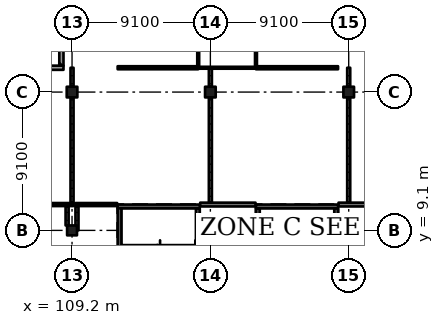
"""IFC4 building model, lengths in metres.
Left out: names, types, materials, properties, quantities, classifications, styles, units other than length and angle.
Written with IfcOpenShell. Run it as: python <this file> out.ifc"""

import sys

from ifc_helpers import new_model, si_unit, direction, frame, frame_2d, origin, origin_2d, place, context, subcontext, project, spatial, rectangle, extrude, element, fill, save


model = new_model("IFC4")
c1 = context("Model", 3, precision=1e-05, world=origin(), true_north=direction((0.0, 1.0)))
c2 = subcontext(c1, "Body", "Model", "MODEL_VIEW")
j1 = project(units=[si_unit("LENGTHUNIT", "METRE"), si_unit("PLANEANGLEUNIT", "RADIAN")], contexts=[c1])
p1 = place(None, origin())
s1 = spatial("IfcSite", under=j1, at=p1, CompositionType="ELEMENT")
p2 = place(p1, origin())
s2 = spatial("IfcBuilding", under=s1, at=p2, CompositionType="ELEMENT")
p3 = place(p2, frame((0.0, 0.0, 15.47)))
s3 = spatial("IfcBuildingStorey", under=s2, at=p3, CompositionType="ELEMENT", Elevation=15.47)
p4 = place(p3, frame((109.2, 9.1, 0.0), z_axis=(0.0, 0.0, 1.0), x_axis=(1.0, 0.0, 0.0)))
e1 = element("IfcColumn", 1, at=p4, inside=s3, PredefinedType="COLUMN", context=c2, shape_type="SweptSolid", body=[
    extrude(rectangle(XDim=0.65, YDim=0.65, at=origin_2d()), origin(), (0.0, 0.0, 1.0), 4.55),
])
p5 = place(p3, frame((109.2, 18.2, 0.0), z_axis=(0.0, 0.0, 1.0), x_axis=(1.0, 0.0, 0.0)))
e2 = element("IfcColumn", 2, at=p5, inside=s3, PredefinedType="COLUMN", context=c2, shape_type="SweptSolid", body=[
    extrude(rectangle(XDim=0.7, YDim=0.7, at=origin_2d()), origin(), (0.0, 0.0, 1.0), 4.55),
])
p6 = place(p3, frame((118.3, 9.1, 0.0), z_axis=(0.0, 0.0, 1.0), x_axis=(1.0, 0.0, 0.0)))
e3 = element("IfcColumn", 3, at=p6, inside=s3, PredefinedType="COLUMN", context=c2, shape_type="SweptSolid", body=[
    extrude(rectangle(XDim=0.6, YDim=0.6, at=origin_2d()), origin(), (0.0, 0.0, 1.0), 4.55),
])
p7 = place(p3, frame((118.3, 18.2, 0.0), z_axis=(0.0, 0.0, 1.0), x_axis=(1.0, 0.0, 0.0)))
e4 = element("IfcColumn", 4, at=p7, inside=s3, PredefinedType="COLUMN", context=c2, shape_type="SweptSolid", body=[
    extrude(rectangle(XDim=0.7, YDim=0.7, at=origin_2d()), origin(), (0.0, 0.0, 1.0), 4.55),
])
p8 = place(p3, frame((127.4, 9.1, 0.0), z_axis=(0.0, 0.0, 1.0), x_axis=(1.0, 0.0, 0.0)))
e5 = element("IfcColumn", 5, at=p8, inside=s3, PredefinedType="COLUMN", context=c2, shape_type="SweptSolid", body=[
    extrude(rectangle(XDim=0.6, YDim=0.6, at=origin_2d()), origin(), (0.0, 0.0, 1.0), 4.55),
])
p9 = place(p3, frame((127.4, 18.2, 0.0), z_axis=(0.0, 0.0, 1.0), x_axis=(1.0, 0.0, 0.0)))
e6 = element("IfcColumn", 6, at=p9, inside=s3, PredefinedType="COLUMN", context=c2, shape_type="SweptSolid", body=[
    extrude(rectangle(XDim=0.7, YDim=0.7, at=origin_2d()), origin(), (0.0, 0.0, 1.0), 4.55),
])
p10 = place(p3, frame((126.7, 10.675, 0.0), z_axis=(0.0, 0.0, 1.0), x_axis=(-1.0, 0.0, 0.0)))
e7 = element("IfcWall", 7, at=p10, inside=s3, PredefinedType="SHEAR", context=c2, shape_type="SweptSolid", body=[
    extrude(rectangle(XDim=5.4, YDim=0.25, at=frame_2d((2.7, 0.0))), origin(), (0.0, 0.0, 1.0), 4.55),
])
p11 = place(p10, frame((1.5, 0.0, 0.0)))
e8 = element("IfcOpeningElement", 8, at=p11, cuts=e7, PredefinedType="OPENING", context=c2, shape_type="SweptSolid", body=[
    extrude(rectangle(XDim=2.4, YDim=2.1, at=frame_2d((1.2, 1.05))), frame((0.0, 0.135, 0.0), z_axis=(0.0, -1.0, 0.0), x_axis=(1.0, 0.0, 0.0)), (0.0, 0.0, 1.0), 0.27),
])
for number, where, z_axis, x_axis in (
    (9, (121.425, 10.55, 0.0), (0.0, 0.0, 1.0), (0.0, -1.0, 0.0)),
    (10, (126.575, 10.55, 0.0), (0.0, 0.0, 1.0), (0.0, -1.0, 0.0)),
):
    element("IfcWall", number, at=place(p3, frame(where, z_axis=z_axis, x_axis=x_axis)), inside=s3, PredefinedType="SHEAR", context=c2, shape_type="SweptSolid", body=[
        extrude(rectangle(XDim=9.6, YDim=0.25, at=frame_2d((4.8, 0.0))), origin(), (0.0, 0.0, 1.0), 4.55),
    ])
p12 = place(p3, frame((117.6, 10.675, 0.0), z_axis=(0.0, 0.0, 1.0), x_axis=(-1.0, 0.0, 0.0)))
e11 = element("IfcWall", 11, at=p12, inside=s3, PredefinedType="SHEAR", context=c2, shape_type="SweptSolid", body=[
    extrude(rectangle(XDim=5.4, YDim=0.25, at=frame_2d((2.7, 0.0))), origin(), (0.0, 0.0, 1.0), 4.55),
])
p13 = place(p12, frame((1.5, 0.0, 0.0)))
e12 = element("IfcOpeningElement", 12, at=p13, cuts=e11, PredefinedType="OPENING", context=c2, shape_type="SweptSolid", body=[
    extrude(rectangle(XDim=2.4, YDim=2.1, at=frame_2d((1.2, 1.05))), frame((0.0, 0.135, 0.0), z_axis=(0.0, -1.0, 0.0), x_axis=(1.0, 0.0, 0.0)), (0.0, 0.0, 1.0), 0.27),
])
for number, where, z_axis, x_axis in (
    (13, (112.325, 10.55, 0.0), (0.0, 0.0, 1.0), (0.0, -1.0, 0.0)),
    (14, (117.475, 10.55, 0.0), (0.0, 0.0, 1.0), (0.0, -1.0, 0.0)),
):
    element("IfcWall", number, at=place(p3, frame(where, z_axis=z_axis, x_axis=x_axis)), inside=s3, PredefinedType="SHEAR", context=c2, shape_type="SweptSolid", body=[
        extrude(rectangle(XDim=9.6, YDim=0.25, at=frame_2d((4.8, 0.0))), origin(), (0.0, 0.0, 1.0), 4.55),
    ])
p14 = place(p3, frame((104.95, 19.8, 0.0), z_axis=(0.0, 0.0, 1.0), x_axis=(1.0, 0.0, 0.0)))
e15 = element("IfcWall", 15, at=p14, inside=s3, PredefinedType="SOLIDWALL", context=c2, shape_type="SweptSolid", body=[
    extrude(rectangle(XDim=3.688, YDim=0.275, at=frame_2d((1.844, 0.0))), origin(), (0.0, 0.0, 1.0), 4.3),
])
p15 = place(p14, frame((1.25, 0.0, 0.0)))
e16 = element("IfcOpeningElement", 16, at=p15, cuts=e15, PredefinedType="OPENING", context=c2, shape_type="SweptSolid", body=[
    extrude(rectangle(XDim=1.2, YDim=2.4, at=frame_2d((0.6, 1.2))), frame((0.0, 0.147, 0.0), z_axis=(0.0, -1.0, 0.0), x_axis=(1.0, 0.0, 0.0)), (0.0, 0.0, 1.0), 0.295),
])
p16 = place(p3, frame((108.5, 19.938, 0.0), z_axis=(0.0, 0.0, 1.0), x_axis=(0.0, 1.0, 0.0)))
e17 = element("IfcWall", 17, at=p16, inside=s3, PredefinedType="SOLIDWALL", context=c2, shape_type="SweptSolid", body=[
    extrude(rectangle(XDim=6.9, YDim=0.275, at=frame_2d((3.45, 0.0))), origin(), (0.0, 0.0, 1.0), 4.3),
])
p17 = place(p3, frame((108.875, 9.425, 0.0), z_axis=(0.0, 0.0, 1.0), x_axis=(0.0, 1.0, 0.0)))
e18 = element("IfcWall", 18, at=p17, inside=s3, PredefinedType="PARTITIONING", context=c2, shape_type="SweptSolid", body=[
    extrude(rectangle(XDim=1.275, YDim=0.2, at=frame_2d((0.637, 0.0))), origin(), (0.0, 0.0, 1.0), 4.3),
])
p18 = place(p3, frame((104.538, 10.8, 0.0), z_axis=(0.0, 0.0, 1.0), x_axis=(1.0, 0.0, 0.0)))
e19 = element("IfcWall", 19, at=p18, inside=s3, PredefinedType="PARTITIONING", context=c2, shape_type="SweptSolid", body=[
    extrude(rectangle(XDim=4.762, YDim=0.2, at=frame_2d((2.381, 0.0))), origin(), (0.0, 0.0, 1.0), 4.3),
])
p19 = place(p18, frame((1.288, 0.0, 0.0)))
e20 = element("IfcOpeningElement", 20, at=p19, cuts=e19, PredefinedType="OPENING", context=c2, shape_type="SweptSolid", body=[
    extrude(rectangle(XDim=1.8, YDim=2.4, at=frame_2d((0.9, 1.2))), frame((0.0, 0.11, 0.0), z_axis=(0.0, -1.0, 0.0), x_axis=(1.0, 0.0, 0.0)), (0.0, 0.0, 1.0), 0.22),
])
p20 = place(p3, frame((109.2, 10.9, 0.0), z_axis=(0.0, 0.0, 1.0), x_axis=(0.0, 1.0, 0.0)))
e21 = element("IfcWall", 21, at=p20, inside=s3, PredefinedType="PARTITIONING", context=c2, shape_type="SweptSolid", body=[
    extrude(rectangle(XDim=6.95, YDim=0.2, at=frame_2d((3.475, 0.0))), origin(), (0.0, 0.0, 1.0), 3.55),
])
p21 = place(p20, frame((0.85, 0.0, 0.0)))
e22 = element("IfcOpeningElement", 22, at=p21, cuts=e21, PredefinedType="OPENING", context=c2, shape_type="SweptSolid", body=[
    extrude(rectangle(XDim=1.8, YDim=2.4, at=frame_2d((0.9, 1.2))), frame((0.0, 0.11, 0.0), z_axis=(0.0, -1.0, 0.0), x_axis=(1.0, 0.0, 0.0)), (0.0, 0.0, 1.0), 0.22),
])
p22 = place(p20, frame((4.35, 0.0, 0.0)))
e23 = element("IfcOpeningElement", 23, at=p22, cuts=e21, PredefinedType="OPENING", context=c2, shape_type="SweptSolid", body=[
    extrude(rectangle(XDim=1.8, YDim=2.4, at=frame_2d((0.9, 1.2))), frame((0.0, 0.11, 0.0), z_axis=(0.0, -1.0, 0.0), x_axis=(1.0, 0.0, 0.0)), (0.0, 0.0, 1.0), 0.22),
])
p23 = place(p3, frame((109.2, 18.55, 0.0), z_axis=(0.0, 0.0, 1.0), x_axis=(0.0, 1.0, 0.0)))
e24 = element("IfcWall", 24, at=p23, inside=s3, PredefinedType="PARTITIONING", context=c2, shape_type="SweptSolid", body=[
    extrude(rectangle(XDim=1.25, YDim=0.2, at=frame_2d((0.625, 0.0))), origin(), (0.0, 0.0, 1.0), 3.55),
])
p24 = place(p3, frame((109.525, 9.1, 0.0), z_axis=(0.0, 0.0, 1.0), x_axis=(0.0, 1.0, 0.0)))
e25 = element("IfcWall", 25, at=p24, inside=s3, PredefinedType="PARTITIONING", context=c2, shape_type="SweptSolid", body=[
    extrude(rectangle(XDim=1.6, YDim=0.2, at=frame_2d((0.8, 0.0))), origin(), (0.0, 0.0, 1.0), 4.3),
])
p25 = place(p3, frame((112.17, 10.8, 0.0), z_axis=(0.0, 0.0, 1.0), x_axis=(-1.0, 0.0, 0.0)))
e26 = element("IfcWall", 26, at=p25, inside=s3, PredefinedType="PARTITIONING", context=c2, shape_type="SweptSolid", body=[
    extrude(rectangle(XDim=2.745, YDim=0.2, at=frame_2d((1.373, 0.0))), origin(), (0.0, 0.0, 1.0), 4.3),
])
p26 = place(p25, frame((0.45, 0.0, 0.0)))
e27 = element("IfcOpeningElement", 27, at=p26, cuts=e26, PredefinedType="OPENING", context=c2, shape_type="SweptSolid", body=[
    extrude(rectangle(XDim=1.8, YDim=2.4, at=frame_2d((0.9, 1.2))), frame((0.0, 0.11, 0.0), z_axis=(0.0, -1.0, 0.0), x_axis=(1.0, 0.0, 0.0)), (0.0, 0.0, 1.0), 0.22),
])
p27 = place(p3, frame((112.2, 19.8, 0.0), z_axis=(0.0, 0.0, 1.0), x_axis=(1.0, 0.0, 0.0)))
e28 = element("IfcWall", 28, at=p27, inside=s3, PredefinedType="PARTITIONING", context=c2, shape_type="SweptSolid", body=[
    extrude(rectangle(XDim=5.3, YDim=0.2, at=frame_2d((2.65, 0.0))), origin(), (0.0, 0.0, 1.0), 4.3),
])
p28 = place(p27, frame((1.75, 0.0, 0.0)))
e29 = element("IfcOpeningElement", 29, at=p28, cuts=e28, PredefinedType="OPENING", context=c2, shape_type="SweptSolid", body=[
    extrude(rectangle(XDim=1.8, YDim=2.4, at=frame_2d((0.9, 1.2))), frame((0.0, 0.11, 0.0), z_axis=(0.0, -1.0, 0.0), x_axis=(1.0, 0.0, 0.0)), (0.0, 0.0, 1.0), 0.22),
])
p29 = place(p3, frame((117.5, 19.8, 0.0), z_axis=(0.0, 0.0, 1.0), x_axis=(1.0, 0.0, 0.0)))
e30 = element("IfcWall", 30, at=p29, inside=s3, PredefinedType="PARTITIONING", context=c2, shape_type="SweptSolid", body=[
    extrude(rectangle(XDim=3.8, YDim=0.125, at=frame_2d((1.9, 0.0))), origin(), (0.0, 0.0, 1.0), 4.3),
])
p30 = place(p29, frame((1.85, 0.0, 0.0)))
e31 = element("IfcOpeningElement", 31, at=p30, cuts=e30, PredefinedType="OPENING", context=c2, shape_type="SweptSolid", body=[
    extrude(rectangle(XDim=0.9, YDim=2.1, at=frame_2d((0.45, 1.05))), frame((0.0, 0.073, 0.0), z_axis=(0.0, -1.0, 0.0), x_axis=(1.0, 0.0, 0.0)), (0.0, 0.0, 1.0), 0.145),
])
p31 = place(p3, frame((117.5, 19.9, 0.0), z_axis=(0.0, 0.0, 1.0), x_axis=(0.0, 1.0, 0.0)))
e32 = element("IfcWall", 32, at=p31, inside=s3, PredefinedType="PARTITIONING", context=c2, shape_type="SweptSolid", body=[
    extrude(rectangle(XDim=2.87, YDim=0.125, at=frame_2d((1.435, 0.0))), origin(), (0.0, 0.0, 1.0), 4.3),
])
for number, where, z_axis, x_axis in (
    (33, (117.63, 8.8, 0.0), (0.0, 0.0, 1.0), (1.0, 0.0, 0.0)),
    (34, (118.0, 9.4, 0.0), (0.0, 0.0, 1.0), (-1.0, 0.0, 0.0)),
):
    element("IfcWall", number, at=place(p3, frame(where, z_axis=z_axis, x_axis=x_axis)), inside=s3, PredefinedType="SOLIDWALL", context=c2, shape_type="SweptSolid", body=[
        extrude(rectangle(XDim=0.37, YDim=0.25, at=frame_2d((0.185, 0.0))), origin(), (0.0, 0.0, 1.0), 4.3),
    ])
p32 = place(p3, frame((117.63, 10.8, 0.0), z_axis=(0.0, 0.0, 1.0), x_axis=(1.0, 0.0, 0.0)))
e35 = element("IfcWall", 35, at=p32, inside=s3, PredefinedType="SOLIDWALL", context=c2, shape_type="SweptSolid", body=[
    extrude(rectangle(XDim=3.64, YDim=0.25, at=frame_2d((1.82, 0.0))), origin(), (0.0, 0.0, 1.0), 4.3),
])
p33 = place(p32, frame((1.69, 0.0, 0.0)))
e36 = element("IfcOpeningElement", 36, at=p33, cuts=e35, PredefinedType="OPENING", context=c2, shape_type="SweptSolid", body=[
    extrude(rectangle(XDim=1.0, YDim=2.1, at=frame_2d((0.5, 1.05))), frame((0.0, 0.135, 0.0), z_axis=(0.0, -1.0, 0.0), x_axis=(1.0, 0.0, 0.0)), (0.0, 0.0, 1.0), 0.27),
])
p34 = place(p3, frame((118.3, 10.925, 0.0), z_axis=(0.0, 0.0, 1.0), x_axis=(0.0, 1.0, 0.0)))
e37 = element("IfcWall", 37, at=p34, inside=s3, PredefinedType="PARTITIONING", context=c2, shape_type="SweptSolid", body=[
    extrude(rectangle(XDim=6.925, YDim=0.2, at=frame_2d((3.462, 0.0))), origin(), (0.0, 0.0, 1.0), 3.55),
])
p35 = place(p34, frame((0.85, 0.0, 0.0)))
e38 = element("IfcOpeningElement", 38, at=p35, cuts=e37, PredefinedType="OPENING", context=c2, shape_type="SweptSolid", body=[
    extrude(rectangle(XDim=1.8, YDim=2.4, at=frame_2d((0.9, 1.2))), frame((0.0, 0.11, 0.0), z_axis=(0.0, -1.0, 0.0), x_axis=(1.0, 0.0, 0.0)), (0.0, 0.0, 1.0), 0.22),
])
p36 = place(p34, frame((4.25, 0.0, 0.0)))
e39 = element("IfcOpeningElement", 39, at=p36, cuts=e37, PredefinedType="OPENING", context=c2, shape_type="SweptSolid", body=[
    extrude(rectangle(XDim=1.8, YDim=2.4, at=frame_2d((0.9, 1.2))), frame((0.0, 0.11, 0.0), z_axis=(0.0, -1.0, 0.0), x_axis=(1.0, 0.0, 0.0)), (0.0, 0.0, 1.0), 0.22),
])
p37 = place(p3, frame((118.3, 18.55, 0.0), z_axis=(0.0, 0.0, 1.0), x_axis=(0.0, 1.0, 0.0)))
e40 = element("IfcWall", 40, at=p37, inside=s3, PredefinedType="PARTITIONING", context=c2, shape_type="SweptSolid", body=[
    extrude(rectangle(XDim=1.188, YDim=0.2, at=frame_2d((0.594, 0.0))), origin(), (0.0, 0.0, 1.0), 3.55),
])
p38 = place(p3, frame((121.3, 19.8, 0.0), z_axis=(0.0, 0.0, 1.0), x_axis=(1.0, 0.0, 0.0)))
e41 = element("IfcWall", 41, at=p38, inside=s3, PredefinedType="PARTITIONING", context=c2, shape_type="SweptSolid", body=[
    extrude(rectangle(XDim=5.4, YDim=0.2, at=frame_2d((2.7, 0.0))), origin(), (0.0, 0.0, 1.0), 4.3),
])
p39 = place(p38, frame((1.85, 0.0, 0.0)))
e42 = element("IfcOpeningElement", 42, at=p39, cuts=e41, PredefinedType="OPENING", context=c2, shape_type="SweptSolid", body=[
    extrude(rectangle(XDim=1.8, YDim=2.4, at=frame_2d((0.9, 1.2))), frame((0.0, 0.11, 0.0), z_axis=(0.0, -1.0, 0.0), x_axis=(1.0, 0.0, 0.0)), (0.0, 0.0, 1.0), 0.22),
])
p40 = place(p3, frame((121.3, 19.9, 0.0), z_axis=(0.0, 0.0, 1.0), x_axis=(0.0, 1.0, 0.0)))
e43 = element("IfcWall", 43, at=p40, inside=s3, PredefinedType="PARTITIONING", context=c2, shape_type="SweptSolid", body=[
    extrude(rectangle(XDim=6.97, YDim=0.125, at=frame_2d((3.485, 0.0))), origin(), (0.0, 0.0, 1.0), 4.3),
])
for number, where, z_axis, x_axis in (
    (44, (126.73, 8.8, 0.0), (0.0, 0.0, 1.0), (1.0, 0.0, 0.0)),
    (45, (127.1, 9.4, 0.0), (0.0, 0.0, 1.0), (-1.0, 0.0, 0.0)),
):
    element("IfcWall", number, at=place(p3, frame(where, z_axis=z_axis, x_axis=x_axis)), inside=s3, PredefinedType="SOLIDWALL", context=c2, shape_type="SweptSolid", body=[
        extrude(rectangle(XDim=0.37, YDim=0.25, at=frame_2d((0.185, 0.0))), origin(), (0.0, 0.0, 1.0), 4.3),
    ])
p41 = place(p3, frame((126.73, 10.8, 0.0), z_axis=(0.0, 0.0, 1.0), x_axis=(1.0, 0.0, 0.0)))
e46 = element("IfcWall", 46, at=p41, inside=s3, PredefinedType="SOLIDWALL", context=c2, shape_type="SweptSolid", body=[
    extrude(rectangle(XDim=3.64, YDim=0.25, at=frame_2d((1.82, 0.0))), origin(), (0.0, 0.0, 1.0), 4.3),
])
p42 = place(p41, frame((1.79, 0.0, 0.0)))
e47 = element("IfcOpeningElement", 47, at=p42, cuts=e46, PredefinedType="OPENING", context=c2, shape_type="SweptSolid", body=[
    extrude(rectangle(XDim=0.8, YDim=2.1, at=frame_2d((0.4, 1.05))), frame((0.0, 0.135, 0.0), z_axis=(0.0, -1.0, 0.0), x_axis=(1.0, 0.0, 0.0)), (0.0, 0.0, 1.0), 0.27),
])
p43 = place(p3, frame((127.4, 10.925, 0.0), z_axis=(0.0, 0.0, 1.0), x_axis=(0.0, 1.0, 0.0)))
e48 = element("IfcWall", 48, at=p43, inside=s3, PredefinedType="PARTITIONING", context=c2, shape_type="SweptSolid", body=[
    extrude(rectangle(XDim=6.925, YDim=0.2, at=frame_2d((3.462, 0.0))), origin(), (0.0, 0.0, 1.0), 3.55),
])
p44 = place(p43, frame((0.85, 0.0, 0.0)))
e49 = element("IfcOpeningElement", 49, at=p44, cuts=e48, PredefinedType="OPENING", context=c2, shape_type="SweptSolid", body=[
    extrude(rectangle(XDim=1.8, YDim=2.4, at=frame_2d((0.9, 1.2))), frame((0.0, 0.11, 0.0), z_axis=(0.0, -1.0, 0.0), x_axis=(1.0, 0.0, 0.0)), (0.0, 0.0, 1.0), 0.22),
])
p45 = place(p43, frame((4.25, 0.0, 0.0)))
e50 = element("IfcOpeningElement", 50, at=p45, cuts=e48, PredefinedType="OPENING", context=c2, shape_type="SweptSolid", body=[
    extrude(rectangle(XDim=1.8, YDim=2.4, at=frame_2d((0.9, 1.2))), frame((0.0, 0.11, 0.0), z_axis=(0.0, -1.0, 0.0), x_axis=(1.0, 0.0, 0.0)), (0.0, 0.0, 1.0), 0.22),
])
p46 = place(p3, frame((127.4, 18.55, 0.0), z_axis=(0.0, 0.0, 1.0), x_axis=(0.0, 1.0, 0.0)))
e51 = element("IfcWall", 51, at=p46, inside=s3, PredefinedType="PARTITIONING", context=c2, shape_type="SweptSolid", body=[
    extrude(rectangle(XDim=1.25, YDim=0.2, at=frame_2d((0.625, 0.0))), origin(), (0.0, 0.0, 1.0), 3.55),
])
p47 = place(p30, origin())
e52 = element("IfcDoor", 52, at=p47, inside=s3, OperationType="SINGLE_SWING_LEFT", PredefinedType="DOOR", context=c2, shape_type="SweptSolid", body=[
    extrude(rectangle(XDim=0.9, YDim=2.1, at=frame_2d((0.45, 1.05))), frame((0.0, 0.025, 0.0), z_axis=(0.0, -1.0, 0.0), x_axis=(1.0, 0.0, 0.0)), (0.0, 0.0, 1.0), 0.05),
])
fill(e31, e52)
p48 = place(p33, origin())
e53 = element("IfcDoor", 53, at=p48, inside=s3, OperationType="SINGLE_SWING_RIGHT", PredefinedType="DOOR", context=c2, shape_type="SweptSolid", body=[
    extrude(rectangle(XDim=1.0, YDim=2.1, at=frame_2d((0.5, 1.05))), frame((0.0, 0.025, 0.0), z_axis=(0.0, -1.0, 0.0), x_axis=(1.0, 0.0, 0.0)), (0.0, 0.0, 1.0), 0.05),
])
fill(e36, e53)
p49 = place(p44, origin())
e54 = element("IfcDoor", 54, at=p49, inside=s3, OperationType="DOUBLE_DOOR_SINGLE_SWING", PredefinedType="DOOR", context=c2, shape_type="SweptSolid", body=[
    extrude(rectangle(XDim=1.8, YDim=2.4, at=frame_2d((0.9, 1.2))), frame((0.0, 0.025, 0.0), z_axis=(0.0, -1.0, 0.0), x_axis=(1.0, 0.0, 0.0)), (0.0, 0.0, 1.0), 0.05),
])
fill(e49, e54)
p50 = place(p45, origin())
e55 = element("IfcDoor", 55, at=p50, inside=s3, OperationType="DOUBLE_DOOR_SINGLE_SWING", PredefinedType="DOOR", context=c2, shape_type="SweptSolid", body=[
    extrude(rectangle(XDim=1.8, YDim=2.4, at=frame_2d((0.9, 1.2))), frame((0.0, 0.025, 0.0), z_axis=(0.0, -1.0, 0.0), x_axis=(1.0, 0.0, 0.0)), (0.0, 0.0, 1.0), 0.05),
])
fill(e50, e55)
p51 = place(p35, origin())
e56 = element("IfcDoor", 56, at=p51, inside=s3, OperationType="DOUBLE_DOOR_SINGLE_SWING", PredefinedType="DOOR", context=c2, shape_type="SweptSolid", body=[
    extrude(rectangle(XDim=1.8, YDim=2.4, at=frame_2d((0.9, 1.2))), frame((0.0, 0.025, 0.0), z_axis=(0.0, -1.0, 0.0), x_axis=(1.0, 0.0, 0.0)), (0.0, 0.0, 1.0), 0.05),
])
fill(e38, e56)
p52 = place(p36, origin())
e57 = element("IfcDoor", 57, at=p52, inside=s3, OperationType="DOUBLE_DOOR_SINGLE_SWING", PredefinedType="DOOR", context=c2, shape_type="SweptSolid", body=[
    extrude(rectangle(XDim=1.8, YDim=2.4, at=frame_2d((0.9, 1.2))), frame((0.0, 0.025, 0.0), z_axis=(0.0, -1.0, 0.0), x_axis=(1.0, 0.0, 0.0)), (0.0, 0.0, 1.0), 0.05),
])
fill(e39, e57)
p53 = place(p39, origin())
e58 = element("IfcDoor", 58, at=p53, inside=s3, OperationType="DOUBLE_DOOR_SINGLE_SWING", PredefinedType="DOOR", context=c2, shape_type="SweptSolid", body=[
    extrude(rectangle(XDim=1.8, YDim=2.4, at=frame_2d((0.9, 1.2))), frame((0.0, 0.025, 0.0), z_axis=(0.0, -1.0, 0.0), x_axis=(1.0, 0.0, 0.0)), (0.0, 0.0, 1.0), 0.05),
])
fill(e42, e58)
p54 = place(p21, origin())
e59 = element("IfcDoor", 59, at=p54, inside=s3, OperationType="DOUBLE_DOOR_SINGLE_SWING", PredefinedType="DOOR", context=c2, shape_type="SweptSolid", body=[
    extrude(rectangle(XDim=1.8, YDim=2.4, at=frame_2d((0.9, 1.2))), frame((0.0, 0.025, 0.0), z_axis=(0.0, -1.0, 0.0), x_axis=(1.0, 0.0, 0.0)), (0.0, 0.0, 1.0), 0.05),
])
fill(e22, e59)
p55 = place(p22, origin())
e60 = element("IfcDoor", 60, at=p55, inside=s3, OperationType="DOUBLE_DOOR_SINGLE_SWING", PredefinedType="DOOR", context=c2, shape_type="SweptSolid", body=[
    extrude(rectangle(XDim=1.8, YDim=2.4, at=frame_2d((0.9, 1.2))), frame((0.0, 0.025, 0.0), z_axis=(0.0, -1.0, 0.0), x_axis=(1.0, 0.0, 0.0)), (0.0, 0.0, 1.0), 0.05),
])
fill(e23, e60)
p56 = place(p28, origin())
e61 = element("IfcDoor", 61, at=p56, inside=s3, OperationType="DOUBLE_DOOR_SINGLE_SWING", PredefinedType="DOOR", context=c2, shape_type="SweptSolid", body=[
    extrude(rectangle(XDim=1.8, YDim=2.4, at=frame_2d((0.9, 1.2))), frame((0.0, 0.025, 0.0), z_axis=(0.0, -1.0, 0.0), x_axis=(1.0, 0.0, 0.0)), (0.0, 0.0, 1.0), 0.05),
])
fill(e29, e61)
p57 = place(p26, origin())
e62 = element("IfcDoor", 62, at=p57, inside=s3, OperationType="DOUBLE_DOOR_SINGLE_SWING", PredefinedType="DOOR", context=c2, shape_type="SweptSolid", body=[
    extrude(rectangle(XDim=1.8, YDim=2.4, at=frame_2d((0.9, 1.2))), frame((0.0, 0.025, 0.0), z_axis=(0.0, -1.0, 0.0), x_axis=(1.0, 0.0, 0.0)), (0.0, 0.0, 1.0), 0.05),
])
fill(e27, e62)
p58 = place(p11, origin())
e63 = element("IfcDoor", 63, at=p58, inside=s3, OperationType="DOUBLE_DOOR_SINGLE_SWING", PredefinedType="DOOR", context=c2, shape_type="SweptSolid", body=[
    extrude(rectangle(XDim=2.4, YDim=2.1, at=frame_2d((1.2, 1.05))), frame((0.0, 0.025, 0.0), z_axis=(0.0, -1.0, 0.0), x_axis=(1.0, 0.0, 0.0)), (0.0, 0.0, 1.0), 0.05),
])
fill(e8, e63)
p59 = place(p13, origin())
e64 = element("IfcDoor", 64, at=p59, inside=s3, OperationType="DOUBLE_DOOR_SINGLE_SWING", PredefinedType="DOOR", context=c2, shape_type="SweptSolid", body=[
    extrude(rectangle(XDim=2.4, YDim=2.1, at=frame_2d((1.2, 1.05))), frame((0.0, 0.025, 0.0), z_axis=(0.0, -1.0, 0.0), x_axis=(1.0, 0.0, 0.0)), (0.0, 0.0, 1.0), 0.05),
])
fill(e12, e64)
save(model, sys.argv[1])
